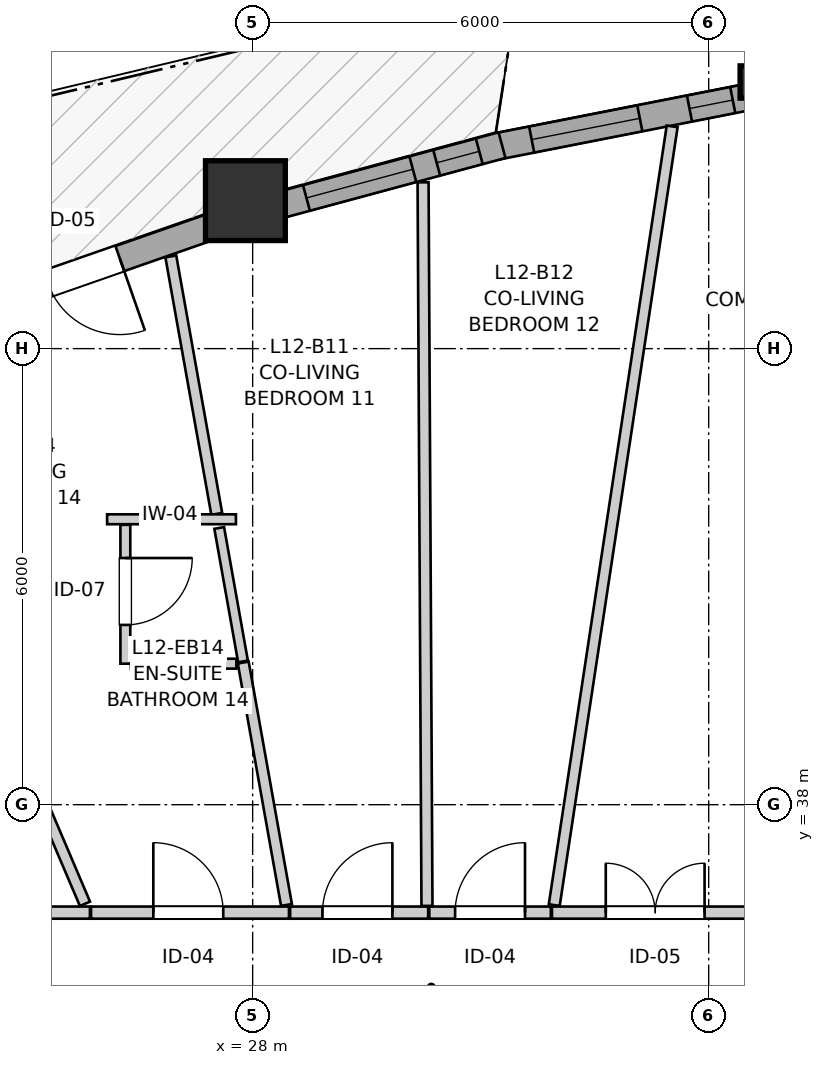
"""IFC4 building model, lengths in metres.
Left out: names, types, materials, properties, quantities, classifications, styles, units other than length and angle.
Written with IfcOpenShell. Run it as: python <this file> out.ifc"""

import sys

from ifc_helpers import new_model, si_unit, direction, frame, frame_2d, origin, origin_2d, place, context, subcontext, project, spatial, rectangle, i_section, extrude, source, transform, mapped, element, fill, save


model = new_model("IFC4")
c1 = context("Model", 3, precision=1e-05, world=origin(), true_north=direction((0.0, 1.0)))
c2 = subcontext(c1, "Body", "Model", "MODEL_VIEW")
j1 = project(units=[si_unit("LENGTHUNIT", "METRE"), si_unit("PLANEANGLEUNIT", "RADIAN")], contexts=[c1])
p1 = place(None, origin())
s1 = spatial("IfcSite", under=j1, at=p1, CompositionType="ELEMENT")
p2 = place(p1, origin())
s2 = spatial("IfcBuilding", under=s1, at=p2, CompositionType="ELEMENT")
p3 = place(p2, frame((0.0, 0.0, 43.0)))
s3 = spatial("IfcBuildingStorey", under=s2, at=p3, CompositionType="ELEMENT", Elevation=43.0)
m1 = source(origin(), c2, "Body", "SweptSolid", [
    extrude(i_section(OverallWidth=0.409, OverallDepth=0.425, WebThickness=0.03, FlangeThickness=0.048, FilletRadius=0.015, at=origin_2d()), origin(), (0.0, 0.0, 1.0), 2.94),
])
p4 = place(p3, frame((34.617, 47.508, 0.0), z_axis=(0.0, 0.0, 1.0), x_axis=(1.0, 0.0, 0.0)))
e1 = element("IfcColumn", 1, at=p4, inside=s3, PredefinedType="PILASTER", context=c2, shape_type="MappedRepresentation", body=[
    mapped(m1, transform((0.0, 0.0, 0.0), x_axis=(1.0, 0.0, 0.0), y_axis=(0.0, 1.0, 0.0), z_axis=(0.0, 0.0, 1.0), scale=1.0)),
])
m2 = source(origin(), c2, "Body", "SweptSolid", [
    extrude(rectangle(XDim=1.05, YDim=1.05, at=origin_2d()), origin(), (0.0, 0.0, 1.0), 2.94),
])
p5 = place(p3, frame((27.905, 45.947, 0.0), z_axis=(0.0, 0.0, 1.0), x_axis=(1.0, 0.0, 0.0)))
e2 = element("IfcColumn", 2, at=p5, inside=s3, PredefinedType="COLUMN", context=c2, shape_type="MappedRepresentation", body=[
    mapped(m2, transform((0.0, 0.0, 0.0), x_axis=(1.0, 0.0, 0.0), y_axis=(0.0, 1.0, 0.0), z_axis=(0.0, 0.0, 1.0), scale=1.0)),
])
p6 = place(p3, frame((34.632, 47.332, 0.0), z_axis=(0.0, 0.0, 1.0), x_axis=(-0.981234691866, -0.192817217796, 0.0)))
e3 = element("IfcWall", 3, at=p6, inside=s3, PredefinedType="SOLIDWALL", context=c2, shape_type="SweptSolid", body=[
    extrude(rectangle(XDim=3.502, YDim=0.35, at=frame_2d((1.751, 0.0))), origin(), (0.0, 0.0, 1.0), 2.42),
])
p7 = place(p6, frame((0.321, 0.0, 0.82)))
e4 = element("IfcOpeningElement", 4, at=p7, cuts=e3, PredefinedType="OPENING", context=c2, shape_type="SweptSolid", body=[
    extrude(rectangle(XDim=0.58, YDim=1.35, at=frame_2d((0.29, 0.675))), frame((0.0, 0.185, 0.0), z_axis=(0.0, -1.0, 0.0), x_axis=(1.0, 0.0, 0.0)), (0.0, 0.0, 1.0), 0.37),
])
p8 = place(p6, frame((1.567, 0.0, 0.82)))
e5 = element("IfcOpeningElement", 5, at=p8, cuts=e3, PredefinedType="OPENING", context=c2, shape_type="SweptSolid", body=[
    extrude(rectangle(XDim=1.45, YDim=1.25, at=frame_2d((0.725, 0.625))), frame((0.0, 0.185, 0.0), z_axis=(0.0, -1.0, 0.0), x_axis=(1.0, 0.0, 0.0)), (0.0, 0.0, 1.0), 0.37),
])
p9 = place(p3, frame((31.281, 46.677, 0.0), z_axis=(0.0, 0.0, 1.0), x_axis=(-0.965445661484, -0.260604441101, 0.0)))
e6 = element("IfcWall", 6, at=p9, inside=s3, PredefinedType="SOLIDWALL", context=c2, shape_type="SweptSolid", body=[
    extrude(rectangle(XDim=3.15, YDim=0.35, at=frame_2d((1.575, 0.0))), origin(), (0.0, 0.0, 1.0), 2.42),
])
p10 = place(p9, frame((0.31, 0.0, 0.82)))
e7 = element("IfcOpeningElement", 7, at=p10, cuts=e6, PredefinedType="OPENING", context=c2, shape_type="SweptSolid", body=[
    extrude(rectangle(XDim=0.58, YDim=1.35, at=frame_2d((0.29, 0.675))), frame((0.0, 0.185, 0.0), z_axis=(0.0, -1.0, 0.0), x_axis=(1.0, 0.0, 0.0)), (0.0, 0.0, 1.0), 0.37),
])
p11 = place(p9, frame((1.215, 0.0, 0.82)))
e8 = element("IfcOpeningElement", 8, at=p11, cuts=e6, PredefinedType="OPENING", context=c2, shape_type="SweptSolid", body=[
    extrude(rectangle(XDim=1.45, YDim=1.25, at=frame_2d((0.725, 0.625))), frame((0.0, 0.185, 0.0), z_axis=(0.0, -1.0, 0.0), x_axis=(1.0, 0.0, 0.0)), (0.0, 0.0, 1.0), 0.37),
])
p12 = place(p3, frame((27.679, 45.683, 0.0), z_axis=(0.0, 0.0, 1.0), x_axis=(-0.944147093892, -0.32952430122, 0.0)))
e9 = element("IfcWall", 9, at=p12, inside=s3, PredefinedType="SOLIDWALL", context=c2, shape_type="SweptSolid", body=[
    extrude(rectangle(XDim=3.094, YDim=0.35, at=frame_2d((1.547, 0.0))), origin(), (0.0, 0.0, 1.0), 2.42),
])
p13 = place(p12, frame((1.511, 0.0, 0.0)))
e10 = element("IfcOpeningElement", 10, at=p13, cuts=e9, PredefinedType="OPENING", context=c2, shape_type="SweptSolid", body=[
    extrude(rectangle(XDim=1.0, YDim=2.1, at=frame_2d((0.5, 1.05))), frame((0.0, 0.185, 0.0), z_axis=(0.0, -1.0, 0.0), x_axis=(1.0, 0.0, 0.0)), (0.0, 0.0, 1.0), 0.37),
])
p14 = place(p3, frame((22.361, 36.58, 0.0), z_axis=(0.0, 0.0, 1.0), x_axis=(1.0, 0.0, 0.0)))
e11 = element("IfcWall", 11, at=p14, inside=s3, PredefinedType="PARTITIONING", context=c2, shape_type="SweptSolid", body=[
    extrude(rectangle(XDim=3.498, YDim=0.16, at=frame_2d((1.749, 0.0))), origin(), (0.0, 0.0, 1.0), 2.548),
])
p15 = place(p14, frame((1.291, 0.0, 0.0)))
e12 = element("IfcOpeningElement", 12, at=p15, cuts=e11, PredefinedType="OPENING", context=c2, shape_type="SweptSolid", body=[
    extrude(rectangle(XDim=0.92, YDim=2.1, at=frame_2d((0.46, 1.05))), frame((0.0, 0.09, 0.0), z_axis=(0.0, -1.0, 0.0), x_axis=(1.0, 0.0, 0.0)), (0.0, 0.0, 1.0), 0.18),
])
p16 = place(p3, frame((31.938, 36.58, 0.0), z_axis=(0.0, 0.0, 1.0), x_axis=(1.0, 0.0, 0.0)))
e13 = element("IfcWall", 13, at=p16, inside=s3, PredefinedType="PARTITIONING", context=c2, shape_type="SweptSolid", body=[
    extrude(rectangle(XDim=2.718, YDim=0.16, at=frame_2d((1.359, 0.0))), origin(), (0.0, 0.0, 1.0), 2.94),
])
p17 = place(p16, frame((0.708, 0.0, 0.0)))
e14 = element("IfcOpeningElement", 14, at=p17, cuts=e13, PredefinedType="OPENING", context=c2, shape_type="SweptSolid", body=[
    extrude(rectangle(XDim=1.3, YDim=2.1, at=frame_2d((0.65, 1.05))), frame((0.0, 0.09, 0.0), z_axis=(0.0, -1.0, 0.0), x_axis=(1.0, 0.0, 0.0)), (0.0, 0.0, 1.0), 0.18),
])
p18 = place(p3, frame((25.874, 36.58, 0.0), z_axis=(0.0, 0.0, 1.0), x_axis=(1.0, 0.0, 0.0)))
e15 = element("IfcWall", 15, at=p18, inside=s3, PredefinedType="PARTITIONING", context=c2, shape_type="SweptSolid", body=[
    extrude(rectangle(XDim=2.604, YDim=0.16, at=frame_2d((1.302, 0.0))), origin(), (0.0, 0.0, 1.0), 2.94),
])
p19 = place(p18, frame((0.819, 0.0, 0.0)))
e16 = element("IfcOpeningElement", 16, at=p19, cuts=e15, PredefinedType="OPENING", context=c2, shape_type="SweptSolid", body=[
    extrude(rectangle(XDim=0.92, YDim=2.1, at=frame_2d((0.46, 1.05))), frame((0.0, 0.09, 0.0), z_axis=(0.0, -1.0, 0.0), x_axis=(1.0, 0.0, 0.0)), (0.0, 0.0, 1.0), 0.18),
])
p20 = place(p3, frame((26.325, 41.682, 0.0), z_axis=(0.0, 0.0, 1.0), x_axis=(0.0, -1.0, 0.0)))
e17 = element("IfcWall", 17, at=p20, inside=s3, PredefinedType="PARTITIONING", context=c2, shape_type="SweptSolid", body=[
    extrude(rectangle(XDim=1.827, YDim=0.13, at=frame_2d((0.914, 0.0))), origin(), (0.0, 0.0, 1.0), 2.94),
])
p21 = place(p20, frame((0.437, 0.0, 0.0)))
e18 = element("IfcOpeningElement", 18, at=p21, cuts=e17, PredefinedType="OPENING", context=c2, shape_type="SweptSolid", body=[
    extrude(rectangle(XDim=0.88, YDim=2.05, at=frame_2d((0.44, 1.025))), frame((0.0, 0.075, 0.0), z_axis=(0.0, -1.0, 0.0), x_axis=(1.0, 0.0, 0.0)), (0.0, 0.0, 1.0), 0.15),
])
p22 = place(p3, frame((28.493, 36.58, 0.0), z_axis=(0.0, 0.0, 1.0), x_axis=(1.0, 0.0, 0.0)))
e19 = element("IfcWall", 19, at=p22, inside=s3, PredefinedType="PARTITIONING", context=c2, shape_type="SweptSolid", body=[
    extrude(rectangle(XDim=1.816, YDim=0.16, at=frame_2d((0.908, 0.0))), origin(), (0.0, 0.0, 1.0), 2.94),
])
p23 = place(p22, frame((0.426, 0.0, 0.0)))
e20 = element("IfcOpeningElement", 20, at=p23, cuts=e19, PredefinedType="OPENING", context=c2, shape_type="SweptSolid", body=[
    extrude(rectangle(XDim=0.92, YDim=2.1, at=frame_2d((0.46, 1.05))), frame((0.0, 0.09, 0.0), z_axis=(0.0, -1.0, 0.0), x_axis=(1.0, 0.0, 0.0)), (0.0, 0.0, 1.0), 0.18),
])
p24 = place(p3, frame((30.324, 36.58, 0.0), z_axis=(0.0, 0.0, 1.0), x_axis=(1.0, 0.0, 0.0)))
e21 = element("IfcWall", 21, at=p24, inside=s3, PredefinedType="PARTITIONING", context=c2, shape_type="SweptSolid", body=[
    extrude(rectangle(XDim=1.599, YDim=0.16, at=frame_2d((0.8, 0.0))), origin(), (0.0, 0.0, 1.0), 2.94),
])
p25 = place(p24, frame((0.34, 0.0, 0.0)))
e22 = element("IfcOpeningElement", 22, at=p25, cuts=e21, PredefinedType="OPENING", context=c2, shape_type="SweptSolid", body=[
    extrude(rectangle(XDim=0.92, YDim=2.1, at=frame_2d((0.46, 1.05))), frame((0.0, 0.09, 0.0), z_axis=(0.0, -1.0, 0.0), x_axis=(1.0, 0.0, 0.0)), (0.0, 0.0, 1.0), 0.18),
])
p26 = place(p3, frame((31.968, 36.679, 0.0), z_axis=(0.0, 0.0, 1.0), x_axis=(0.149735581821, 0.9887260771, 0.0)))
e23 = element("IfcWall", 23, at=p26, inside=s3, PredefinedType="PARTITIONING", context=c2, shape_type="SweptSolid", body=[
    extrude(rectangle(XDim=10.362, YDim=0.145, at=frame_2d((5.181, 0.0))), origin(), (0.0, 0.0, 1.0), 2.94),
])
p27 = place(p3, frame((30.242, 46.188, 0.0), z_axis=(0.0, 0.0, 1.0), x_axis=(0.00538564204, -0.999985497325, 0.0)))
e24 = element("IfcWall", 24, at=p27, inside=s3, PredefinedType="PARTITIONING", context=c2, shape_type="SweptSolid", body=[
    extrude(rectangle(XDim=9.52, YDim=0.145, at=frame_2d((4.76, 0.0))), origin(), (0.0, 0.0, 1.0), 2.94),
])
p28 = place(p3, frame((26.923, 45.213, 0.0), z_axis=(0.0, 0.0, 1.0), x_axis=(0.175687492323, -0.98444598889, 0.0)))
e25 = element("IfcWall", 25, at=p28, inside=s3, PredefinedType="PARTITIONING", context=c2, shape_type="SweptSolid", body=[
    extrude(rectangle(XDim=3.441, YDim=0.145, at=frame_2d((1.72, 0.0))), origin(), (0.0, 0.0, 1.0), 2.94),
])
p29 = place(p3, frame((27.876, 39.87, 0.0), z_axis=(0.0, 0.0, 1.0), x_axis=(0.175655014507, -0.984451784436, 0.0)))
e26 = element("IfcWall", 26, at=p29, inside=s3, PredefinedType="PARTITIONING", context=c2, shape_type="SweptSolid", body=[
    extrude(rectangle(XDim=3.24, YDim=0.145, at=frame_2d((1.62, 0.0))), origin(), (0.0, 0.0, 1.0), 2.94),
])
p30 = place(p3, frame((24.552, 39.61, 0.0), z_axis=(0.0, 0.0, 1.0), x_axis=(0.391974411108, -0.919976119819, 0.0)))
e27 = element("IfcWall", 27, at=p30, inside=s3, PredefinedType="PARTITIONING", context=c2, shape_type="SweptSolid", body=[
    extrude(rectangle(XDim=3.168, YDim=0.145, at=frame_2d((1.584, 0.0))), origin(), (0.0, 0.0, 1.0), 2.94),
])
p31 = place(p3, frame((27.56, 41.641, 0.0), z_axis=(0.0, 0.0, 1.0), x_axis=(0.175463771609, -0.9844858886, 0.0)))
e28 = element("IfcWall", 28, at=p31, inside=s3, PredefinedType="PARTITIONING", context=c2, shape_type="SweptSolid", body=[
    extrude(rectangle(XDim=1.784, YDim=0.13, at=frame_2d((0.892, 0.0))), origin(), (0.0, 0.0, 1.0), 2.94),
])
p32 = place(p3, frame((26.398, 39.855, 0.0), z_axis=(0.0, 0.0, 1.0), x_axis=(1.0, 0.0, 0.0)))
e29 = element("IfcWall", 29, at=p32, inside=s3, PredefinedType="PARTITIONING", context=c2, shape_type="SweptSolid", body=[
    extrude(rectangle(XDim=1.388, YDim=0.13, at=frame_2d((0.694, 0.0))), origin(), (0.0, 0.0, 1.0), 2.94),
])
p33 = place(p3, frame((26.085, 41.755, 0.0), z_axis=(0.0, 0.0, 1.0), x_axis=(1.0, 0.0, 0.0)))
e30 = element("IfcWall", 30, at=p33, inside=s3, PredefinedType="PARTITIONING", context=c2, shape_type="SweptSolid", body=[
    extrude(rectangle(XDim=1.695, YDim=0.13, at=frame_2d((0.848, 0.0))), origin(), (0.0, 0.0, 1.0), 2.508),
])
m3 = source(origin(), c2, "Body", "SweptSolid", [
    extrude(rectangle(XDim=0.58, YDim=1.35, at=frame_2d((0.29, 0.675))), frame((0.0, 0.03, 0.0), z_axis=(0.0, -1.0, 0.0), x_axis=(1.0, 0.0, 0.0)), (0.0, 0.0, 1.0), 0.06),
])
p34 = place(p7, origin())
e31 = element("IfcWindow", 31, at=p34, inside=s3, PartitioningType="SINGLE_PANEL", PredefinedType="WINDOW", context=c2, shape_type="MappedRepresentation", body=[
    mapped(m3, transform((0.0, 0.0, 0.0), x_axis=(1.0, 0.0, 0.0), y_axis=(0.0, 1.0, 0.0), z_axis=(0.0, 0.0, 1.0), scale=1.0)),
])
fill(e4, e31)
m4 = source(origin(), c2, "Body", "SweptSolid", [
    extrude(rectangle(XDim=1.45, YDim=1.25, at=frame_2d((0.725, 0.625))), frame((0.0, 0.03, 0.0), z_axis=(0.0, -1.0, 0.0), x_axis=(1.0, 0.0, 0.0)), (0.0, 0.0, 1.0), 0.06),
])
p35 = place(p8, origin())
e32 = element("IfcWindow", 32, at=p35, inside=s3, PartitioningType="SINGLE_PANEL", PredefinedType="WINDOW", context=c2, shape_type="MappedRepresentation", body=[
    mapped(m4, transform((0.0, 0.0, 0.0), x_axis=(1.0, 0.0, 0.0), y_axis=(0.0, 1.0, 0.0), z_axis=(0.0, 0.0, 1.0), scale=1.0)),
])
fill(e5, e32)
p36 = place(p10, origin())
e33 = element("IfcWindow", 33, at=p36, inside=s3, PartitioningType="SINGLE_PANEL", PredefinedType="WINDOW", context=c2, shape_type="MappedRepresentation", body=[
    mapped(m3, transform((0.0, 0.0, 0.0), x_axis=(1.0, 0.0, 0.0), y_axis=(0.0, 1.0, 0.0), z_axis=(0.0, 0.0, 1.0), scale=1.0)),
])
fill(e7, e33)
p37 = place(p11, origin())
e34 = element("IfcWindow", 34, at=p37, inside=s3, PartitioningType="SINGLE_PANEL", PredefinedType="WINDOW", context=c2, shape_type="MappedRepresentation", body=[
    mapped(m4, transform((0.0, 0.0, 0.0), x_axis=(1.0, 0.0, 0.0), y_axis=(0.0, 1.0, 0.0), z_axis=(0.0, 0.0, 1.0), scale=1.0)),
])
fill(e8, e34)
m5 = source(origin(), c2, "Body", "SweptSolid", [
    extrude(rectangle(XDim=1.0, YDim=2.1, at=frame_2d((0.5, 1.05))), frame((0.0, 0.025, 0.0), z_axis=(0.0, -1.0, 0.0), x_axis=(1.0, 0.0, 0.0)), (0.0, 0.0, 1.0), 0.05),
])
p38 = place(p13, origin())
e35 = element("IfcDoor", 35, at=p38, inside=s3, OperationType="SINGLE_SWING_LEFT", PredefinedType="DOOR", context=c2, shape_type="MappedRepresentation", body=[
    mapped(m5, transform((0.0, 0.0, 0.0), x_axis=(1.0, 0.0, 0.0), y_axis=(0.0, 1.0, 0.0), z_axis=(0.0, 0.0, 1.0), scale=1.0)),
])
fill(e10, e35)
m6 = source(origin(), c2, "Body", "SweptSolid", [
    extrude(rectangle(XDim=1.3, YDim=2.1, at=frame_2d((0.65, 1.05))), frame((0.0, 0.025, 0.0), z_axis=(0.0, -1.0, 0.0), x_axis=(1.0, 0.0, 0.0)), (0.0, 0.0, 1.0), 0.05),
])
p39 = place(p17, origin())
e36 = element("IfcDoor", 36, at=p39, inside=s3, OperationType="DOUBLE_DOOR_SINGLE_SWING", PredefinedType="DOOR", context=c2, shape_type="MappedRepresentation", body=[
    mapped(m6, transform((0.0, 0.0, 0.0), x_axis=(1.0, 0.0, 0.0), y_axis=(0.0, 1.0, 0.0), z_axis=(0.0, 0.0, 1.0), scale=1.0)),
])
fill(e14, e36)
m7 = source(origin(), c2, "Body", "SweptSolid", [
    extrude(rectangle(XDim=0.92, YDim=2.1, at=frame_2d((0.46, 1.05))), frame((0.0, 0.025, 0.0), z_axis=(0.0, -1.0, 0.0), x_axis=(1.0, 0.0, 0.0)), (0.0, 0.0, 1.0), 0.05),
])
p40 = place(p19, origin())
e37 = element("IfcDoor", 37, at=p40, inside=s3, OperationType="SINGLE_SWING_LEFT", PredefinedType="DOOR", context=c2, shape_type="MappedRepresentation", body=[
    mapped(m7, transform((0.0, 0.0, 0.0), x_axis=(1.0, 0.0, 0.0), y_axis=(0.0, 1.0, 0.0), z_axis=(0.0, 0.0, 1.0), scale=1.0)),
])
fill(e16, e37)
m8 = source(origin(), c2, "Body", "SweptSolid", [
    extrude(rectangle(XDim=0.88, YDim=2.05, at=frame_2d((0.44, 1.025))), frame((0.0, 0.025, 0.0), z_axis=(0.0, -1.0, 0.0), x_axis=(1.0, 0.0, 0.0)), (0.0, 0.0, 1.0), 0.05),
])
p41 = place(p21, origin())
e38 = element("IfcDoor", 38, at=p41, inside=s3, OperationType="SINGLE_SWING_LEFT", PredefinedType="DOOR", context=c2, shape_type="MappedRepresentation", body=[
    mapped(m8, transform((0.0, 0.0, 0.0), x_axis=(1.0, 0.0, 0.0), y_axis=(0.0, 1.0, 0.0), z_axis=(0.0, 0.0, 1.0), scale=1.0)),
])
fill(e18, e38)
p42 = place(p23, origin())
e39 = element("IfcDoor", 39, at=p42, inside=s3, OperationType="SINGLE_SWING_RIGHT", PredefinedType="DOOR", context=c2, shape_type="MappedRepresentation", body=[
    mapped(m7, transform((0.0, 0.0, 0.0), x_axis=(1.0, 0.0, 0.0), y_axis=(0.0, 1.0, 0.0), z_axis=(0.0, 0.0, 1.0), scale=1.0)),
])
fill(e20, e39)
p43 = place(p25, origin())
e40 = element("IfcDoor", 40, at=p43, inside=s3, OperationType="SINGLE_SWING_RIGHT", PredefinedType="DOOR", context=c2, shape_type="MappedRepresentation", body=[
    mapped(m7, transform((0.0, 0.0, 0.0), x_axis=(1.0, 0.0, 0.0), y_axis=(0.0, 1.0, 0.0), z_axis=(0.0, 0.0, 1.0), scale=1.0)),
])
fill(e22, e40)
save(model, sys.argv[1])
